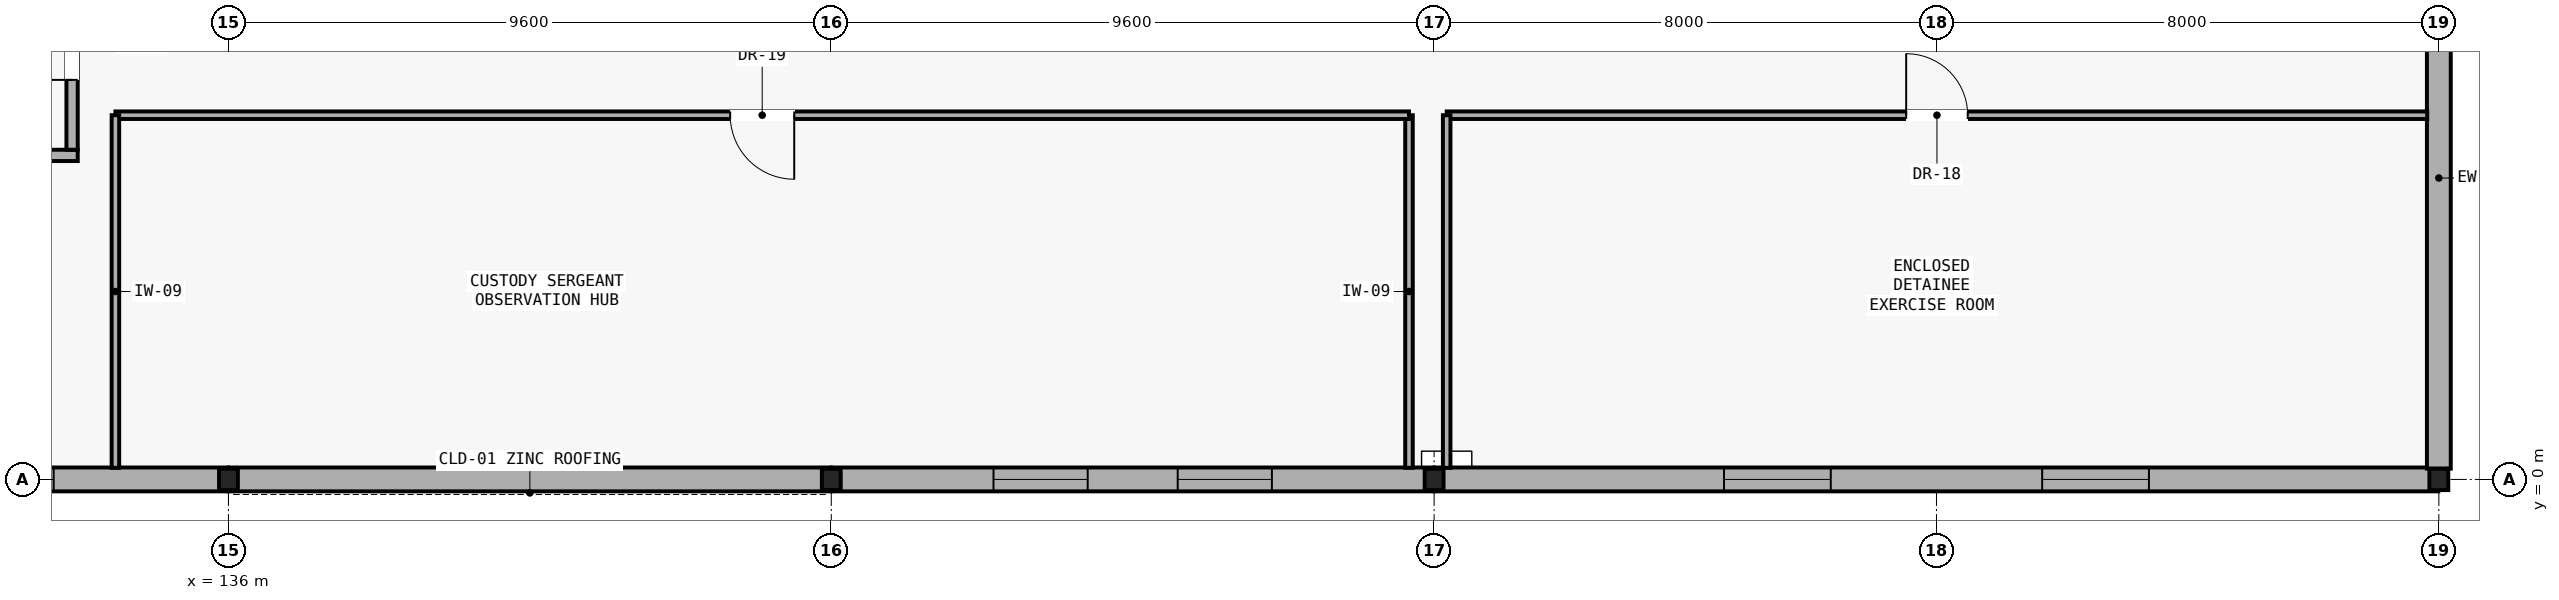
"""IFC4 building model, lengths in metres.
Left out: names, types, materials, properties, quantities, classifications, styles, units other than length and angle.
Written with IfcOpenShell. Run it as: python <this file> out.ifc"""

import sys

from ifc_helpers import new_model, si_unit, direction, frame, frame_2d, origin, origin_2d, place, context, subcontext, project, spatial, rectangle, i_section, extrude, element, fill, save


model = new_model("IFC4")
c1 = context("Model", 3, precision=1e-05, world=origin(), true_north=direction((0.0, 1.0)))
c2 = subcontext(c1, "Body", "Model", "MODEL_VIEW")
j1 = project(units=[si_unit("LENGTHUNIT", "METRE"), si_unit("PLANEANGLEUNIT", "RADIAN")], contexts=[c1])
p1 = place(None, origin())
s1 = spatial("IfcSite", under=j1, at=p1, CompositionType="ELEMENT")
p2 = place(p1, origin())
s2 = spatial("IfcBuilding", under=s1, at=p2, CompositionType="ELEMENT")
p3 = place(p2, frame((0.0, 0.0, 5.25)))
s3 = spatial("IfcBuildingStorey", under=s2, at=p3, CompositionType="ELEMENT", Elevation=5.25)
for number, where, z_axis, x_axis in (
    (1, (136.0, 0.0, 0.0), (0.0, 0.0, 1.0), (1.0, 0.0, 0.0)),
    (2, (145.6, 0.0, 0.0), (0.0, 0.0, 1.0), (1.0, 0.0, 0.0)),
    (3, (155.2, 0.0, 0.0), (0.0, 0.0, 1.0), (1.0, 0.0, 0.0)),
    (4, (171.2, 0.0, 0.0), (0.0, 0.0, 1.0), (1.0, 0.0, 0.0)),
):
    element("IfcColumn", number, at=place(p3, frame(where, z_axis=z_axis, x_axis=x_axis)), inside=s3, PredefinedType="COLUMN", context=c2, shape_type="SweptSolid", body=[
        extrude(i_section(OverallWidth=0.3, OverallDepth=0.34, WebThickness=0.012, FlangeThickness=0.021, FilletRadius=0.027, at=origin_2d()), origin(), (0.0, 0.0, 1.0), 4.2),
    ])
p4 = place(p3, frame((126.408, 0.0, 0.0), z_axis=(0.0, 0.0, 1.0), x_axis=(1.0, 0.0, 0.0)))
e5 = element("IfcWall", 5, at=p4, inside=s3, PredefinedType="SOLIDWALL", context=c2, shape_type="SweptSolid", body=[
    extrude(rectangle(XDim=9.584, YDim=0.38, at=frame_2d((4.792, 0.0))), origin(), (0.0, 0.0, 1.0), 3.63),
])
p5 = place(p4, frame((2.775, 0.0, 1.7)))
e6 = element("IfcOpeningElement", 6, at=p5, cuts=e5, PredefinedType="OPENING", context=c2, shape_type="SweptSolid", body=[
    extrude(rectangle(XDim=1.1, YDim=0.7, at=frame_2d((0.55, 0.35))), frame((0.0, 0.2, 0.0), z_axis=(0.0, -1.0, 0.0), x_axis=(1.0, 0.0, 0.0)), (0.0, 0.0, 1.0), 0.4),
])
p6 = place(p4, frame((5.709, 0.0, 1.7)))
e7 = element("IfcOpeningElement", 7, at=p6, cuts=e5, PredefinedType="OPENING", context=c2, shape_type="SweptSolid", body=[
    extrude(rectangle(XDim=1.1, YDim=0.7, at=frame_2d((0.55, 0.35))), frame((0.0, 0.2, 0.0), z_axis=(0.0, -1.0, 0.0), x_axis=(1.0, 0.0, 0.0)), (0.0, 0.0, 1.0), 0.4),
])
p7 = place(p3, frame((136.008, 0.0, 0.0), z_axis=(0.0, 0.0, 1.0), x_axis=(1.0, 0.0, 0.0)))
e8 = element("IfcWall", 8, at=p7, inside=s3, PredefinedType="SOLIDWALL", context=c2, shape_type="SweptSolid", body=[
    extrude(rectangle(XDim=9.584, YDim=0.38, at=frame_2d((4.792, 0.0))), origin(), (0.0, 0.0, 1.0), 3.63),
])
p8 = place(p3, frame((145.608, 0.0, 0.0), z_axis=(0.0, 0.0, 1.0), x_axis=(1.0, 0.0, 0.0)))
e9 = element("IfcWall", 9, at=p8, inside=s3, PredefinedType="SOLIDWALL", context=c2, shape_type="SweptSolid", body=[
    extrude(rectangle(XDim=9.584, YDim=0.38, at=frame_2d((4.792, 0.0))), origin(), (0.0, 0.0, 1.0), 3.63),
])
p9 = place(p8, frame((2.575, 0.0, 1.7)))
e10 = element("IfcOpeningElement", 10, at=p9, cuts=e9, PredefinedType="OPENING", context=c2, shape_type="SweptSolid", body=[
    extrude(rectangle(XDim=1.5, YDim=0.7, at=frame_2d((0.75, 0.35))), frame((0.0, 0.2, 0.0), z_axis=(0.0, -1.0, 0.0), x_axis=(1.0, 0.0, 0.0)), (0.0, 0.0, 1.0), 0.4),
])
p10 = place(p8, frame((5.509, 0.0, 1.7)))
e11 = element("IfcOpeningElement", 11, at=p10, cuts=e9, PredefinedType="OPENING", context=c2, shape_type="SweptSolid", body=[
    extrude(rectangle(XDim=1.5, YDim=0.7, at=frame_2d((0.75, 0.35))), frame((0.0, 0.2, 0.0), z_axis=(0.0, -1.0, 0.0), x_axis=(1.0, 0.0, 0.0)), (0.0, 0.0, 1.0), 0.4),
])
p11 = place(p3, frame((155.208, 0.0, 0.0), z_axis=(0.0, 0.0, 1.0), x_axis=(1.0, 0.0, 0.0)))
e12 = element("IfcWall", 12, at=p11, inside=s3, PredefinedType="SOLIDWALL", context=c2, shape_type="SweptSolid", body=[
    extrude(rectangle(XDim=15.984, YDim=0.38, at=frame_2d((7.992, 0.0))), origin(), (0.0, 0.0, 1.0), 3.4),
])
p12 = place(p11, frame((4.609, 0.0, 1.7)))
e13 = element("IfcOpeningElement", 13, at=p12, cuts=e12, PredefinedType="OPENING", context=c2, shape_type="SweptSolid", body=[
    extrude(rectangle(XDim=1.7, YDim=0.7, at=frame_2d((0.85, 0.35))), frame((0.0, 0.2, 0.0), z_axis=(0.0, -1.0, 0.0), x_axis=(1.0, 0.0, 0.0)), (0.0, 0.0, 1.0), 0.4),
])
p13 = place(p11, frame((9.675, 0.0, 1.7)))
e14 = element("IfcOpeningElement", 14, at=p13, cuts=e12, PredefinedType="OPENING", context=c2, shape_type="SweptSolid", body=[
    extrude(rectangle(XDim=1.7, YDim=0.7, at=frame_2d((0.85, 0.35))), frame((0.0, 0.2, 0.0), z_axis=(0.0, -1.0, 0.0), x_axis=(1.0, 0.0, 0.0)), (0.0, 0.0, 1.0), 0.4),
])
p14 = place(p3, frame((171.2, 0.172, 0.0), z_axis=(0.0, 0.0, 1.0), x_axis=(0.0, 1.0, 0.0)))
e15 = element("IfcWall", 15, at=p14, inside=s3, PredefinedType="SOLIDWALL", context=c2, shape_type="SweptSolid", body=[
    extrude(rectangle(XDim=9.256, YDim=0.38, at=frame_2d((4.628, 0.0))), origin(), (0.0, 0.0, 1.0), 3.5),
])
p15 = place(p3, frame((127.2, 5.16, 0.0), z_axis=(0.0, 0.0, 1.0), x_axis=(1.0, 0.0, 0.0)))
e16 = element("IfcWall", 16, at=p15, inside=s3, PredefinedType="PARTITIONING", context=c2, shape_type="SweptSolid", body=[
    extrude(rectangle(XDim=6.4, YDim=0.18, at=frame_2d((3.2, 0.0))), origin(), (0.0, 0.0, 1.0), 3.96),
])
p16 = place(p3, frame((133.51, 5.25, 0.0), z_axis=(0.0, 0.0, 1.0), x_axis=(0.0, 1.0, 0.0)))
e17 = element("IfcWall", 17, at=p16, inside=s3, PredefinedType="PARTITIONING", context=c2, shape_type="SweptSolid", body=[
    extrude(rectangle(XDim=3.375, YDim=0.18, at=frame_2d((1.688, 0.0))), origin(), (0.0, 0.0, 1.0), 3.96),
])
p17 = place(p16, frame((1.113, 0.0, 0.0)))
e18 = element("IfcOpeningElement", 18, at=p17, cuts=e17, PredefinedType="OPENING", context=c2, shape_type="SweptSolid", body=[
    extrude(rectangle(XDim=1.15, YDim=2.15, at=frame_2d((0.575, 1.075))), frame((0.0, 0.1, 0.0), z_axis=(0.0, -1.0, 0.0), x_axis=(1.0, 0.0, 0.0)), (0.0, 0.0, 1.0), 0.2),
])
p18 = place(p3, frame((154.8, 0.185, 0.0), z_axis=(0.0, 0.0, 1.0), x_axis=(0.0, 1.0, 0.0)))
e19 = element("IfcWall", 19, at=p18, inside=s3, PredefinedType="PARTITIONING", context=c2, shape_type="SweptSolid", body=[
    extrude(rectangle(XDim=5.615, YDim=0.12, at=frame_2d((2.808, 0.0))), origin(), (0.0, 0.0, 1.0), 3.96),
])
p19 = place(p3, frame((154.8, 5.8, 0.0), z_axis=(0.0, 0.0, 1.0), x_axis=(-1.0, 0.0, 0.0)))
e20 = element("IfcWall", 20, at=p19, inside=s3, PredefinedType="PARTITIONING", context=c2, shape_type="SweptSolid", body=[
    extrude(rectangle(XDim=20.6, YDim=0.12, at=frame_2d((10.3, 0.0))), origin(), (0.0, 0.0, 1.0), 3.96),
])
p20 = place(p19, frame((9.79, 0.0, 0.0)))
e21 = element("IfcOpeningElement", 21, at=p20, cuts=e20, PredefinedType="OPENING", context=c2, shape_type="SweptSolid", body=[
    extrude(rectangle(XDim=1.02, YDim=2.1, at=frame_2d((0.51, 1.05))), frame((0.0, 0.07, 0.0), z_axis=(0.0, -1.0, 0.0), x_axis=(1.0, 0.0, 0.0)), (0.0, 0.0, 1.0), 0.14),
])
p21 = place(p3, frame((134.2, 5.8, 0.0), z_axis=(0.0, 0.0, 1.0), x_axis=(0.0, -1.0, 0.0)))
e22 = element("IfcWall", 22, at=p21, inside=s3, PredefinedType="PARTITIONING", context=c2, shape_type="SweptSolid", body=[
    extrude(rectangle(XDim=5.615, YDim=0.12, at=frame_2d((2.808, 0.0))), origin(), (0.0, 0.0, 1.0), 3.96),
])
p22 = place(p3, frame((171.015, 5.8, 0.0), z_axis=(0.0, 0.0, 1.0), x_axis=(-1.0, 0.0, 0.0)))
e23 = element("IfcWall", 23, at=p22, inside=s3, PredefinedType="PARTITIONING", context=c2, shape_type="SweptSolid", body=[
    extrude(rectangle(XDim=15.615, YDim=0.12, at=frame_2d((7.808, 0.0))), origin(), (0.0, 0.0, 1.0), 3.96),
])
p23 = place(p22, frame((7.317, 0.0, 0.0)))
e24 = element("IfcOpeningElement", 24, at=p23, cuts=e23, PredefinedType="OPENING", context=c2, shape_type="SweptSolid", body=[
    extrude(rectangle(XDim=0.98, YDim=2.1, at=frame_2d((0.49, 1.05))), frame((0.0, 0.07, 0.0), z_axis=(0.0, -1.0, 0.0), x_axis=(1.0, 0.0, 0.0)), (0.0, 0.0, 1.0), 0.14),
])
p24 = place(p3, frame((155.4, 5.8, 0.0), z_axis=(0.0, 0.0, 1.0), x_axis=(0.0, -1.0, 0.0)))
e25 = element("IfcWall", 25, at=p24, inside=s3, PredefinedType="PARTITIONING", context=c2, shape_type="SweptSolid", body=[
    extrude(rectangle(XDim=5.615, YDim=0.12, at=frame_2d((2.808, 0.0))), origin(), (0.0, 0.0, 1.0), 3.5),
])
p25 = place(p6, origin())
e26 = element("IfcWindow", 26, at=p25, inside=s3, PartitioningType="SINGLE_PANEL", PredefinedType="WINDOW", context=c2, shape_type="SweptSolid", body=[
    extrude(rectangle(XDim=1.1, YDim=0.7, at=frame_2d((0.55, 0.35))), frame((0.0, 0.03, 0.0), z_axis=(0.0, -1.0, 0.0), x_axis=(1.0, 0.0, 0.0)), (0.0, 0.0, 1.0), 0.06),
])
fill(e7, e26)
p26 = place(p9, origin())
e27 = element("IfcWindow", 27, at=p26, inside=s3, PartitioningType="SINGLE_PANEL", PredefinedType="WINDOW", context=c2, shape_type="SweptSolid", body=[
    extrude(rectangle(XDim=1.5, YDim=0.7, at=frame_2d((0.75, 0.35))), frame((0.0, 0.03, 0.0), z_axis=(0.0, -1.0, 0.0), x_axis=(1.0, 0.0, 0.0)), (0.0, 0.0, 1.0), 0.06),
])
fill(e10, e27)
p27 = place(p10, origin())
e28 = element("IfcWindow", 28, at=p27, inside=s3, PartitioningType="SINGLE_PANEL", PredefinedType="WINDOW", context=c2, shape_type="SweptSolid", body=[
    extrude(rectangle(XDim=1.5, YDim=0.7, at=frame_2d((0.75, 0.35))), frame((0.0, 0.03, 0.0), z_axis=(0.0, -1.0, 0.0), x_axis=(1.0, 0.0, 0.0)), (0.0, 0.0, 1.0), 0.06),
])
fill(e11, e28)
p28 = place(p12, origin())
e29 = element("IfcWindow", 29, at=p28, inside=s3, PartitioningType="SINGLE_PANEL", PredefinedType="WINDOW", context=c2, shape_type="SweptSolid", body=[
    extrude(rectangle(XDim=1.7, YDim=0.7, at=frame_2d((0.85, 0.35))), frame((0.0, 0.03, 0.0), z_axis=(0.0, -1.0, 0.0), x_axis=(1.0, 0.0, 0.0)), (0.0, 0.0, 1.0), 0.06),
])
fill(e13, e29)
p29 = place(p13, origin())
e30 = element("IfcWindow", 30, at=p29, inside=s3, PartitioningType="SINGLE_PANEL", PredefinedType="WINDOW", context=c2, shape_type="SweptSolid", body=[
    extrude(rectangle(XDim=1.7, YDim=0.7, at=frame_2d((0.85, 0.35))), frame((0.0, 0.03, 0.0), z_axis=(0.0, -1.0, 0.0), x_axis=(1.0, 0.0, 0.0)), (0.0, 0.0, 1.0), 0.06),
])
fill(e14, e30)
p30 = place(p17, origin())
e31 = element("IfcDoor", 31, at=p30, inside=s3, OperationType="SINGLE_SWING_LEFT", PredefinedType="DOOR", context=c2, shape_type="SweptSolid", body=[
    extrude(rectangle(XDim=1.15, YDim=2.15, at=frame_2d((0.575, 1.075))), frame((0.0, 0.025, 0.0), z_axis=(0.0, -1.0, 0.0), x_axis=(1.0, 0.0, 0.0)), (0.0, 0.0, 1.0), 0.05),
])
fill(e18, e31)
p31 = place(p20, origin())
e32 = element("IfcDoor", 32, at=p31, inside=s3, OperationType="SINGLE_SWING_LEFT", PredefinedType="DOOR", context=c2, shape_type="SweptSolid", body=[
    extrude(rectangle(XDim=1.02, YDim=2.1, at=frame_2d((0.51, 1.05))), frame((0.0, 0.025, 0.0), z_axis=(0.0, -1.0, 0.0), x_axis=(1.0, 0.0, 0.0)), (0.0, 0.0, 1.0), 0.05),
])
fill(e21, e32)
p32 = place(p23, frame((0.98, 0.0, 0.0), z_axis=(0.0, 0.0, 1.0), x_axis=(-1.0, 0.0, 0.0)))
e33 = element("IfcDoor", 33, at=p32, inside=s3, OperationType="SINGLE_SWING_RIGHT", PredefinedType="DOOR", context=c2, shape_type="SweptSolid", body=[
    extrude(rectangle(XDim=0.98, YDim=2.1, at=frame_2d((0.49, 1.05))), frame((0.0, 0.025, 0.0), z_axis=(0.0, -1.0, 0.0), x_axis=(1.0, 0.0, 0.0)), (0.0, 0.0, 1.0), 0.05),
])
fill(e24, e33)
save(model, sys.argv[1])
